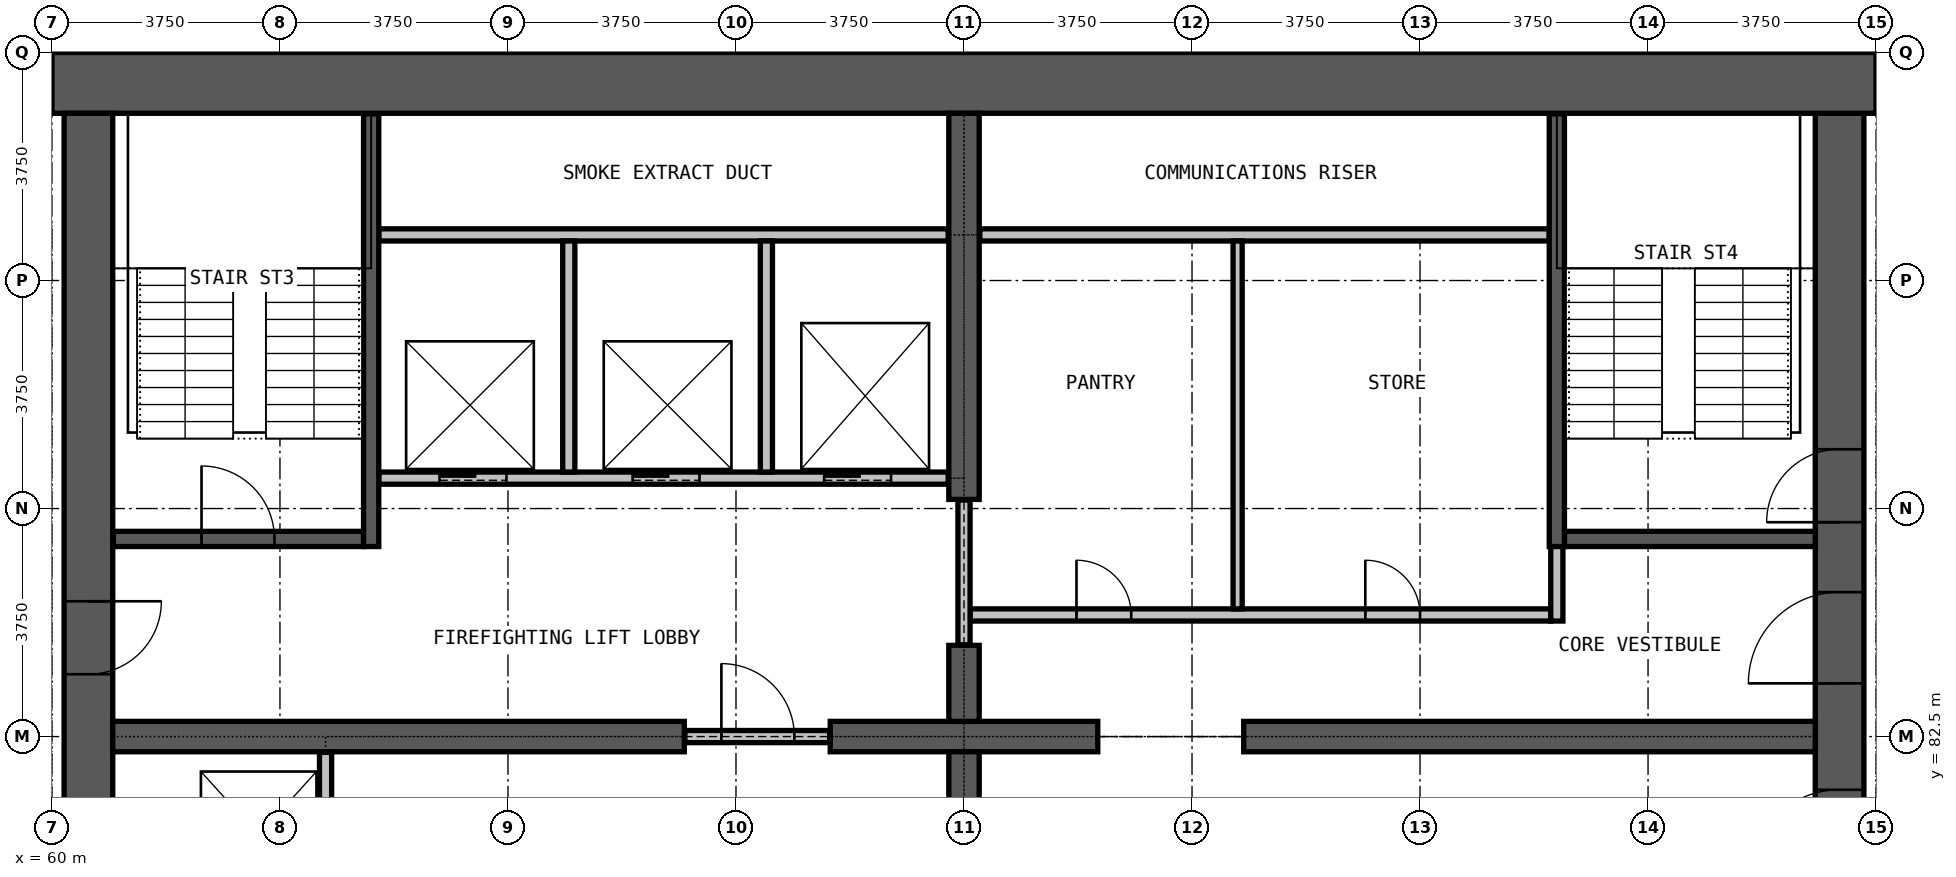
"""IFC4 building model, lengths in metres.
Left out: names, types, materials, properties, quantities, classifications, styles, units other than length and angle.
Written with IfcOpenShell. Run it as: python <this file> out.ifc"""

import sys

from ifc_helpers import new_model, si_unit, direction, frame, frame_2d, origin, place, context, subcontext, project, spatial, rectangle, extrude, element, fill, save


model = new_model("IFC4")
c1 = context("Model", 3, precision=1e-05, world=origin(), true_north=direction((0.0, 1.0)))
c2 = subcontext(c1, "Body", "Model", "MODEL_VIEW")
j1 = project(units=[si_unit("LENGTHUNIT", "METRE"), si_unit("PLANEANGLEUNIT", "RADIAN")], contexts=[c1])
p1 = place(None, origin())
s1 = spatial("IfcSite", under=j1, at=p1, CompositionType="ELEMENT")
p2 = place(p1, origin())
s2 = spatial("IfcBuilding", under=s1, at=p2, CompositionType="ELEMENT")
p3 = place(p2, frame((0.0, 0.0, 107.2)))
s3 = spatial("IfcBuildingStorey", under=s2, at=p3, CompositionType="ELEMENT", Elevation=107.2)
p4 = place(p3, frame((89.4, 72.25, 0.0), z_axis=(0.0, 0.0, 1.0), x_axis=(0.0, 1.0, 0.0)))
e1 = element("IfcWall", 1, at=p4, inside=s3, PredefinedType="SHEAR", context=c2, shape_type="SweptSolid", body=[
    extrude(rectangle(XDim=20.5, YDim=0.8, at=frame_2d((10.25, 0.0))), origin(), (0.0, 0.0, 1.0), 3.6),
])
p5 = place(p4, frame((0.275, 0.0, 0.0)))
e2 = element("IfcOpeningElement", 2, at=p5, cuts=e1, PredefinedType="OPENING", context=c2, shape_type="SweptSolid", body=[
    extrude(rectangle(XDim=1.2, YDim=2.2, at=frame_2d((0.6, 1.1))), frame((0.0, 0.41, 0.0), z_axis=(0.0, -1.0, 0.0), x_axis=(1.0, 0.0, 0.0)), (0.0, 0.0, 1.0), 0.82),
])
p6 = place(p4, frame((13.775, 0.0, 0.0)))
e3 = element("IfcOpeningElement", 3, at=p6, cuts=e1, PredefinedType="OPENING", context=c2, shape_type="SweptSolid", body=[
    extrude(rectangle(XDim=1.2, YDim=2.2, at=frame_2d((0.6, 1.1))), frame((0.0, 0.41, 0.0), z_axis=(0.0, -1.0, 0.0), x_axis=(1.0, 0.0, 0.0)), (0.0, 0.0, 1.0), 0.82),
])
p7 = place(p4, frame((7.875, 0.0, 0.0)))
e4 = element("IfcOpeningElement", 4, at=p7, cuts=e1, PredefinedType="OPENING", context=c2, shape_type="SweptSolid", body=[
    extrude(rectangle(XDim=1.5, YDim=2.2, at=frame_2d((0.75, 1.1))), frame((0.0, 0.41, 0.0), z_axis=(0.0, -1.0, 0.0), x_axis=(1.0, 0.0, 0.0)), (0.0, 0.0, 1.0), 0.82),
])
p8 = place(p4, frame((11.125, 0.0, 0.0)))
e5 = element("IfcOpeningElement", 5, at=p8, cuts=e1, PredefinedType="OPENING", context=c2, shape_type="SweptSolid", body=[
    extrude(rectangle(XDim=1.5, YDim=2.2, at=frame_2d((0.75, 1.1))), frame((0.0, 0.41, 0.0), z_axis=(0.0, -1.0, 0.0), x_axis=(1.0, 0.0, 0.0)), (0.0, 0.0, 1.0), 0.82),
])
p9 = place(p3, frame((90.0, 93.25, 0.0), z_axis=(0.0, 0.0, 1.0), x_axis=(-1.0, 0.0, 0.0)))
e6 = element("IfcWall", 6, at=p9, inside=s3, PredefinedType="SHEAR", context=c2, shape_type="SweptSolid", body=[
    extrude(rectangle(XDim=30.0, YDim=1.0, at=frame_2d((15.0, 0.0))), origin(), (0.0, 0.0, 1.0), 3.6),
])
p10 = place(p3, frame((60.6, 92.75, 0.0), z_axis=(0.0, 0.0, 1.0), x_axis=(0.0, -1.0, 0.0)))
e7 = element("IfcWall", 7, at=p10, inside=s3, PredefinedType="SHEAR", context=c2, shape_type="SweptSolid", body=[
    extrude(rectangle(XDim=20.5, YDim=0.8, at=frame_2d((10.25, 0.0))), origin(), (0.0, 0.0, 1.0), 3.6),
])
p11 = place(p10, frame((19.025, 0.0, 0.0)))
e8 = element("IfcOpeningElement", 8, at=p11, cuts=e7, PredefinedType="OPENING", context=c2, shape_type="SweptSolid", body=[
    extrude(rectangle(XDim=1.2, YDim=2.2, at=frame_2d((0.6, 1.1))), frame((0.0, 0.41, 0.0), z_axis=(0.0, -1.0, 0.0), x_axis=(1.0, 0.0, 0.0)), (0.0, 0.0, 1.0), 0.82),
])
p12 = place(p10, frame((8.025, 0.0, 0.0)))
e9 = element("IfcOpeningElement", 9, at=p12, cuts=e7, PredefinedType="OPENING", context=c2, shape_type="SweptSolid", body=[
    extrude(rectangle(XDim=1.2, YDim=2.2, at=frame_2d((0.6, 1.1))), frame((0.0, 0.41, 0.0), z_axis=(0.0, -1.0, 0.0), x_axis=(1.0, 0.0, 0.0)), (0.0, 0.0, 1.0), 0.82),
])
p13 = place(p3, frame((61.0, 82.5, 0.0), z_axis=(0.0, 0.0, 1.0), x_axis=(1.0, 0.0, 0.0)))
e10 = element("IfcWall", 10, at=p13, inside=s3, PredefinedType="SHEAR", context=c2, shape_type="SweptSolid", body=[
    extrude(rectangle(XDim=9.4, YDim=0.5, at=frame_2d((4.7, 0.0))), origin(), (0.0, 0.0, 1.0), 3.6),
])
p14 = place(p3, frame((72.8, 82.5, 0.0), z_axis=(0.0, 0.0, 1.0), x_axis=(1.0, 0.0, 0.0)))
e11 = element("IfcWall", 11, at=p14, inside=s3, PredefinedType="SHEAR", context=c2, shape_type="SweptSolid", body=[
    extrude(rectangle(XDim=4.4, YDim=0.5, at=frame_2d((2.2, 0.0))), origin(), (0.0, 0.0, 1.0), 3.6),
])
p15 = place(p3, frame((79.6, 82.5, 0.0), z_axis=(0.0, 0.0, 1.0), x_axis=(1.0, 0.0, 0.0)))
e12 = element("IfcWall", 12, at=p15, inside=s3, PredefinedType="SHEAR", context=c2, shape_type="SweptSolid", body=[
    extrude(rectangle(XDim=9.4, YDim=0.5, at=frame_2d((4.7, 0.0))), origin(), (0.0, 0.0, 1.0), 3.6),
])
for number, where, z_axis, x_axis in (
    (13, (75.0, 81.0, 0.0), (0.0, 0.0, 1.0), (0.0, 1.0, 0.0)),
    (14, (75.0, 82.75, 0.0), (0.0, 0.0, 1.0), (0.0, 1.0, 0.0)),
):
    element("IfcWall", number, at=place(p3, frame(where, z_axis=z_axis, x_axis=x_axis)), inside=s3, PredefinedType="SHEAR", context=c2, shape_type="SweptSolid", body=[
        extrude(rectangle(XDim=1.25, YDim=0.5, at=frame_2d((0.625, 0.0))), origin(), (0.0, 0.0, 1.0), 3.6),
    ])
p16 = place(p3, frame((75.0, 86.4, 0.0), z_axis=(0.0, 0.0, 1.0), x_axis=(0.0, 1.0, 0.0)))
e15 = element("IfcWall", 15, at=p16, inside=s3, PredefinedType="SHEAR", context=c2, shape_type="SweptSolid", body=[
    extrude(rectangle(XDim=6.35, YDim=0.5, at=frame_2d((3.175, 0.0))), origin(), (0.0, 0.0, 1.0), 3.6),
])
p17 = place(p3, frame((70.41, 82.5, 0.0), z_axis=(0.0, 0.0, 1.0), x_axis=(1.0, 0.0, 0.0)))
e16 = element("IfcWall", 16, at=p17, inside=s3, PredefinedType="PARTITIONING", context=c2, shape_type="SweptSolid", body=[
    extrude(rectangle(XDim=2.38, YDim=0.2, at=frame_2d((1.19, 0.0))), origin(), (0.0, 0.0, 1.0), 2.4),
])
p18 = place(p17, frame((0.6, 0.0, 0.0)))
e17 = element("IfcOpeningElement", 17, at=p18, cuts=e16, PredefinedType="OPENING", context=c2, shape_type="SweptSolid", body=[
    extrude(rectangle(XDim=1.2, YDim=2.2, at=frame_2d((0.6, 1.1))), frame((0.0, 0.11, 0.0), z_axis=(0.0, -1.0, 0.0), x_axis=(1.0, 0.0, 0.0)), (0.0, 0.0, 1.0), 0.22),
])
p19 = place(p3, frame((75.1, 84.5, 0.0), z_axis=(0.0, 0.0, 1.0), x_axis=(1.0, 0.0, 0.0)))
e18 = element("IfcWall", 18, at=p19, inside=s3, PredefinedType="PARTITIONING", context=c2, shape_type="SweptSolid", body=[
    extrude(rectangle(XDim=9.55, YDim=0.2, at=frame_2d((4.775, 0.0))), origin(), (0.0, 0.0, 1.0), 3.3),
])
p20 = place(p19, frame((1.75, 0.0, 0.0)))
e19 = element("IfcOpeningElement", 19, at=p20, cuts=e18, PredefinedType="OPENING", context=c2, shape_type="SweptSolid", body=[
    extrude(rectangle(XDim=0.9, YDim=2.2, at=frame_2d((0.45, 1.1))), frame((0.0, 0.11, 0.0), z_axis=(0.0, -1.0, 0.0), x_axis=(1.0, 0.0, 0.0)), (0.0, 0.0, 1.0), 0.22),
])
p21 = place(p19, frame((6.5, 0.0, 0.0)))
e20 = element("IfcOpeningElement", 20, at=p21, cuts=e18, PredefinedType="OPENING", context=c2, shape_type="SweptSolid", body=[
    extrude(rectangle(XDim=0.9, YDim=2.2, at=frame_2d((0.45, 1.1))), frame((0.0, 0.11, 0.0), z_axis=(0.0, -1.0, 0.0), x_axis=(1.0, 0.0, 0.0)), (0.0, 0.0, 1.0), 0.22),
])
p22 = place(p3, frame((75.26, 90.75, 0.0), z_axis=(0.0, 0.0, 1.0), x_axis=(1.0, 0.0, 0.0)))
e21 = element("IfcWall", 21, at=p22, inside=s3, PredefinedType="PARTITIONING", context=c2, shape_type="SweptSolid", body=[
    extrude(rectangle(XDim=9.365, YDim=0.2, at=frame_2d((4.683, 0.0))), origin(), (0.0, 0.0, 1.0), 3.3),
])
p23 = place(p3, frame((75.0, 84.01, 0.0), z_axis=(0.0, 0.0, 1.0), x_axis=(0.0, 1.0, 0.0)))
e22 = element("IfcWall", 22, at=p23, inside=s3, PredefinedType="PARTITIONING", context=c2, shape_type="SweptSolid", body=[
    extrude(rectangle(XDim=2.38, YDim=0.2, at=frame_2d((1.19, 0.0))), origin(), (0.0, 0.0, 1.0), 2.4),
])
p24 = place(p3, frame((84.75, 84.4, 0.0), z_axis=(0.0, 0.0, 1.0), x_axis=(0.0, 1.0, 0.0)))
e23 = element("IfcWall", 23, at=p24, inside=s3, PredefinedType="PARTITIONING", context=c2, shape_type="SweptSolid", body=[
    extrude(rectangle(XDim=1.475, YDim=0.2, at=frame_2d((0.738, 0.0))), origin(), (0.0, 0.0, 1.0), 3.3),
])
p25 = place(p3, frame((79.5, 84.6, 0.0), z_axis=(0.0, 0.0, 1.0), x_axis=(0.0, 1.0, 0.0)))
e24 = element("IfcWall", 24, at=p25, inside=s3, PredefinedType="PARTITIONING", context=c2, shape_type="SweptSolid", body=[
    extrude(rectangle(XDim=6.05, YDim=0.15, at=frame_2d((3.025, 0.0))), origin(), (0.0, 0.0, 1.0), 3.3),
])
p26 = place(p3, frame((65.375, 86.75, 0.0), z_axis=(0.0, 0.0, 1.0), x_axis=(1.0, 0.0, 0.0)))
e25 = element("IfcWall", 25, at=p26, inside=s3, PredefinedType="PARTITIONING", context=c2, shape_type="SweptSolid", body=[
    extrude(rectangle(XDim=9.365, YDim=0.2, at=frame_2d((4.683, 0.0))), origin(), (0.0, 0.0, 1.0), 3.3),
])
p27 = place(p26, frame((1.0, 0.0, 0.0)))
e26 = element("IfcOpeningElement", 26, at=p27, cuts=e25, PredefinedType="OPENING", context=c2, shape_type="SweptSolid", body=[
    extrude(rectangle(XDim=1.1, YDim=2.2, at=frame_2d((0.55, 1.1))), frame((0.0, 0.11, 0.0), z_axis=(0.0, -1.0, 0.0), x_axis=(1.0, 0.0, 0.0)), (0.0, 0.0, 1.0), 0.22),
])
p28 = place(p26, frame((4.175, 0.0, 0.0)))
e27 = element("IfcOpeningElement", 27, at=p28, cuts=e25, PredefinedType="OPENING", context=c2, shape_type="SweptSolid", body=[
    extrude(rectangle(XDim=1.1, YDim=2.2, at=frame_2d((0.55, 1.1))), frame((0.0, 0.11, 0.0), z_axis=(0.0, -1.0, 0.0), x_axis=(1.0, 0.0, 0.0)), (0.0, 0.0, 1.0), 0.22),
])
p29 = place(p26, frame((7.325, 0.0, 0.0)))
e28 = element("IfcOpeningElement", 28, at=p29, cuts=e25, PredefinedType="OPENING", context=c2, shape_type="SweptSolid", body=[
    extrude(rectangle(XDim=1.1, YDim=2.2, at=frame_2d((0.55, 1.1))), frame((0.0, 0.11, 0.0), z_axis=(0.0, -1.0, 0.0), x_axis=(1.0, 0.0, 0.0)), (0.0, 0.0, 1.0), 0.22),
])
p30 = place(p3, frame((65.375, 90.75, 0.0), z_axis=(0.0, 0.0, 1.0), x_axis=(1.0, 0.0, 0.0)))
e29 = element("IfcWall", 29, at=p30, inside=s3, PredefinedType="PARTITIONING", context=c2, shape_type="SweptSolid", body=[
    extrude(rectangle(XDim=9.365, YDim=0.2, at=frame_2d((4.683, 0.0))), origin(), (0.0, 0.0, 1.0), 3.3),
])
p31 = place(p3, frame((64.5, 79.375, 0.0), z_axis=(0.0, 0.0, 1.0), x_axis=(0.0, 1.0, 0.0)))
e30 = element("IfcWall", 30, at=p31, inside=s3, PredefinedType="PARTITIONING", context=c2, shape_type="SweptSolid", body=[
    extrude(rectangle(XDim=2.865, YDim=0.2, at=frame_2d((1.433, 0.0))), origin(), (0.0, 0.0, 1.0), 3.3),
])
for number, where, z_axis, x_axis in (
    (31, (68.5, 86.85, 0.0), (0.0, 0.0, 1.0), (0.0, 1.0, 0.0)),
    (32, (71.75, 86.85, 0.0), (0.0, 0.0, 1.0), (0.0, 1.0, 0.0)),
):
    element("IfcWall", number, at=place(p3, frame(where, z_axis=z_axis, x_axis=x_axis)), inside=s3, PredefinedType="PARTITIONING", context=c2, shape_type="SweptSolid", body=[
        extrude(rectangle(XDim=3.8, YDim=0.2, at=frame_2d((1.9, 0.0))), origin(), (0.0, 0.0, 1.0), 3.3),
    ])
p32 = place(p3, frame((61.01, 85.75, 0.0), z_axis=(0.0, 0.0, 1.0), x_axis=(1.0, 0.0, 0.0)))
e33 = element("IfcWall", 33, at=p32, inside=s3, PredefinedType="PARTITIONING", context=c2, shape_type="SweptSolid", body=[
    extrude(rectangle(XDim=4.115, YDim=0.25, at=frame_2d((2.058, 0.0))), origin(), (0.0, 0.0, 1.0), 3.3),
])
p33 = place(p32, frame((1.45, 0.0, 0.0)))
e34 = element("IfcOpeningElement", 34, at=p33, cuts=e33, PredefinedType="OPENING", context=c2, shape_type="SweptSolid", body=[
    extrude(rectangle(XDim=1.2, YDim=2.2, at=frame_2d((0.6, 1.1))), frame((0.0, 0.135, 0.0), z_axis=(0.0, -1.0, 0.0), x_axis=(1.0, 0.0, 0.0)), (0.0, 0.0, 1.0), 0.27),
])
p34 = place(p3, frame((84.875, 85.75, 0.0), z_axis=(0.0, 0.0, 1.0), x_axis=(1.0, 0.0, 0.0)))
e35 = element("IfcWall", 35, at=p34, inside=s3, PredefinedType="PARTITIONING", context=c2, shape_type="SweptSolid", body=[
    extrude(rectangle(XDim=4.125, YDim=0.25, at=frame_2d((2.062, 0.0))), origin(), (0.0, 0.0, 1.0), 3.3),
])
for number, where, z_axis, x_axis in (
    (36, (65.25, 85.625, 0.0), (0.0, 0.0, 1.0), (0.0, 1.0, 0.0)),
    (37, (84.75, 85.625, 0.0), (0.0, 0.0, 1.0), (0.0, 1.0, 0.0)),
):
    element("IfcWall", number, at=place(p3, frame(where, z_axis=z_axis, x_axis=x_axis)), inside=s3, PredefinedType="PARTITIONING", context=c2, shape_type="SweptSolid", body=[
        extrude(rectangle(XDim=7.115, YDim=0.25, at=frame_2d((3.558, 0.0))), origin(), (0.0, 0.0, 1.0), 3.3),
    ])
p35 = place(p27, origin())
e38 = element("IfcDoor", 38, at=p35, inside=s3, OperationType="DOUBLE_DOOR_SLIDING", PredefinedType="DOOR", context=c2, shape_type="SweptSolid", body=[
    extrude(rectangle(XDim=1.1, YDim=2.2, at=frame_2d((0.55, 1.1))), frame((0.0, 0.025, 0.0), z_axis=(0.0, -1.0, 0.0), x_axis=(1.0, 0.0, 0.0)), (0.0, 0.0, 1.0), 0.05),
])
fill(e26, e38)
p36 = place(p28, origin())
e39 = element("IfcDoor", 39, at=p36, inside=s3, OperationType="DOUBLE_DOOR_SLIDING", PredefinedType="DOOR", context=c2, shape_type="SweptSolid", body=[
    extrude(rectangle(XDim=1.1, YDim=2.2, at=frame_2d((0.55, 1.1))), frame((0.0, 0.025, 0.0), z_axis=(0.0, -1.0, 0.0), x_axis=(1.0, 0.0, 0.0)), (0.0, 0.0, 1.0), 0.05),
])
fill(e27, e39)
p37 = place(p29, origin())
e40 = element("IfcDoor", 40, at=p37, inside=s3, OperationType="DOUBLE_DOOR_SLIDING", PredefinedType="DOOR", context=c2, shape_type="SweptSolid", body=[
    extrude(rectangle(XDim=1.1, YDim=2.2, at=frame_2d((0.55, 1.1))), frame((0.0, 0.025, 0.0), z_axis=(0.0, -1.0, 0.0), x_axis=(1.0, 0.0, 0.0)), (0.0, 0.0, 1.0), 0.05),
])
fill(e28, e40)
p38 = place(p18, origin())
e41 = element("IfcDoor", 41, at=p38, inside=s3, OperationType="SINGLE_SWING_LEFT", PredefinedType="DOOR", context=c2, shape_type="SweptSolid", body=[
    extrude(rectangle(XDim=1.2, YDim=2.2, at=frame_2d((0.6, 1.1))), frame((0.0, 0.025, 0.0), z_axis=(0.0, -1.0, 0.0), x_axis=(1.0, 0.0, 0.0)), (0.0, 0.0, 1.0), 0.05),
])
fill(e17, e41)
p39 = place(p33, origin())
e42 = element("IfcDoor", 42, at=p39, inside=s3, OperationType="SINGLE_SWING_RIGHT", PredefinedType="DOOR", context=c2, shape_type="SweptSolid", body=[
    extrude(rectangle(XDim=1.2, YDim=2.2, at=frame_2d((0.6, 1.1))), frame((0.0, 0.025, 0.0), z_axis=(0.0, -1.0, 0.0), x_axis=(1.0, 0.0, 0.0)), (0.0, 0.0, 1.0), 0.05),
])
fill(e34, e42)
p40 = place(p6, origin())
e43 = element("IfcDoor", 43, at=p40, inside=s3, OperationType="SINGLE_SWING_LEFT", PredefinedType="DOOR", context=c2, shape_type="SweptSolid", body=[
    extrude(rectangle(XDim=1.2, YDim=2.2, at=frame_2d((0.6, 1.1))), frame((0.0, 0.025, 0.0), z_axis=(0.0, -1.0, 0.0), x_axis=(1.0, 0.0, 0.0)), (0.0, 0.0, 1.0), 0.05),
])
fill(e3, e43)
p41 = place(p7, origin())
e44 = element("IfcDoor", 44, at=p41, inside=s3, OperationType="DOUBLE_DOOR_SINGLE_SWING", PredefinedType="DOOR", context=c2, shape_type="SweptSolid", body=[
    extrude(rectangle(XDim=1.5, YDim=2.2, at=frame_2d((0.75, 1.1))), frame((0.0, 0.025, 0.0), z_axis=(0.0, -1.0, 0.0), x_axis=(1.0, 0.0, 0.0)), (0.0, 0.0, 1.0), 0.05),
])
fill(e4, e44)
p42 = place(p12, origin())
e45 = element("IfcDoor", 45, at=p42, inside=s3, OperationType="SINGLE_SWING_LEFT", PredefinedType="DOOR", context=c2, shape_type="SweptSolid", body=[
    extrude(rectangle(XDim=1.2, YDim=2.2, at=frame_2d((0.6, 1.1))), frame((0.0, 0.025, 0.0), z_axis=(0.0, -1.0, 0.0), x_axis=(1.0, 0.0, 0.0)), (0.0, 0.0, 1.0), 0.05),
])
fill(e9, e45)
p43 = place(p8, origin())
e46 = element("IfcDoor", 46, at=p43, inside=s3, OperationType="DOUBLE_DOOR_SINGLE_SWING", PredefinedType="DOOR", context=c2, shape_type="SweptSolid", body=[
    extrude(rectangle(XDim=1.5, YDim=2.2, at=frame_2d((0.75, 1.1))), frame((0.0, 0.025, 0.0), z_axis=(0.0, -1.0, 0.0), x_axis=(1.0, 0.0, 0.0)), (0.0, 0.0, 1.0), 0.05),
])
fill(e5, e46)
p44 = place(p20, origin())
e47 = element("IfcDoor", 47, at=p44, inside=s3, OperationType="SINGLE_SWING_LEFT", PredefinedType="DOOR", context=c2, shape_type="SweptSolid", body=[
    extrude(rectangle(XDim=0.9, YDim=2.2, at=frame_2d((0.45, 1.1))), frame((0.0, 0.025, 0.0), z_axis=(0.0, -1.0, 0.0), x_axis=(1.0, 0.0, 0.0)), (0.0, 0.0, 1.0), 0.05),
])
fill(e19, e47)
p45 = place(p21, origin())
e48 = element("IfcDoor", 48, at=p45, inside=s3, OperationType="SINGLE_SWING_LEFT", PredefinedType="DOOR", context=c2, shape_type="SweptSolid", body=[
    extrude(rectangle(XDim=0.9, YDim=2.2, at=frame_2d((0.45, 1.1))), frame((0.0, 0.025, 0.0), z_axis=(0.0, -1.0, 0.0), x_axis=(1.0, 0.0, 0.0)), (0.0, 0.0, 1.0), 0.05),
])
fill(e20, e48)
save(model, sys.argv[1])
